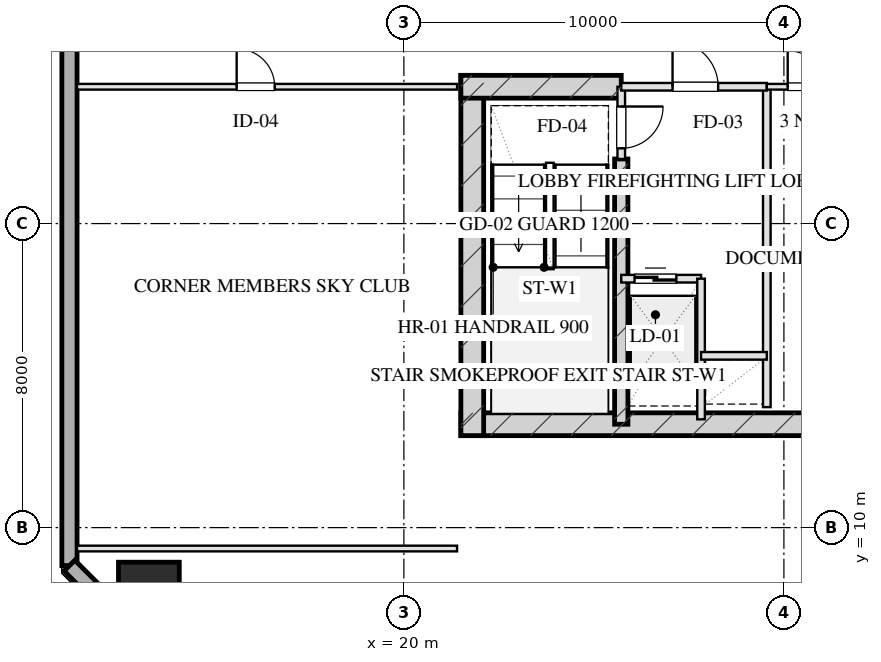
"""IFC4 building model, lengths in metres.
Left out: names, types, materials, properties, quantities, classifications, styles, units other than length and angle.
Written with IfcOpenShell. Run it as: python <this file> out.ifc"""

import sys

from ifc_helpers import new_model, si_unit, direction, frame, frame_2d, origin, origin_2d, place, context, subcontext, project, spatial, rectangle, hollow_rectangle, extrude, element, fill, save


model = new_model("IFC4")
c1 = context("Model", 3, precision=1e-05, world=origin(), true_north=direction((0.0, 1.0)))
c2 = subcontext(c1, "Body", "Model", "MODEL_VIEW")
j1 = project(units=[si_unit("LENGTHUNIT", "METRE"), si_unit("PLANEANGLEUNIT", "RADIAN")], contexts=[c1])
p1 = place(None, origin())
s1 = spatial("IfcSite", under=j1, at=p1, CompositionType="ELEMENT")
p2 = place(p1, origin())
s2 = spatial("IfcBuilding", under=s1, at=p2, CompositionType="ELEMENT")
p3 = place(p2, frame((0.0, 0.0, 152.95)))
s3 = spatial("IfcBuildingStorey", under=s2, at=p3, CompositionType="ELEMENT", Elevation=152.95)
p4 = place(p3, frame((21.5, 12.72, 0.0), z_axis=(0.0, 0.0, 1.0), x_axis=(1.0, 0.0, 0.0)))
e1 = element("IfcWall", 1, at=p4, inside=s3, PredefinedType="SHEAR", context=c2, shape_type="SweptSolid", body=[
    extrude(rectangle(XDim=17.0, YDim=0.6, at=frame_2d((8.5, 0.0))), origin(), (0.0, 0.0, 1.0), 3.45),
])
p5 = place(p3, frame((21.8, 21.9, 0.0), z_axis=(0.0, 0.0, 1.0), x_axis=(0.0, -1.0, 0.0)))
e2 = element("IfcWall", 2, at=p5, inside=s3, PredefinedType="SHEAR", context=c2, shape_type="SweptSolid", body=[
    extrude(rectangle(XDim=9.48, YDim=0.6, at=frame_2d((4.74, 0.0))), origin(), (0.0, 0.0, 1.0), 3.45),
])
p6 = place(p3, frame((25.72, 19.7, 0.0), z_axis=(0.0, 0.0, 1.0), x_axis=(0.0, -1.0, 0.0)))
e3 = element("IfcWall", 3, at=p6, inside=s3, PredefinedType="SHEAR", context=c2, shape_type="SweptSolid", body=[
    extrude(rectangle(XDim=6.98, YDim=0.35, at=frame_2d((3.49, 0.0))), origin(), (0.0, 0.0, 1.0), 3.45),
])
p7 = place(p3, frame((21.5, 21.6, 0.0), z_axis=(0.0, 0.0, 1.0), x_axis=(1.0, 0.0, 0.0)))
e4 = element("IfcWall", 4, at=p7, inside=s3, PredefinedType="SHEAR", context=c2, shape_type="SweptSolid", body=[
    extrude(rectangle(XDim=4.22, YDim=0.6, at=frame_2d((2.11, 0.0))), origin(), (0.0, 0.0, 1.0), 3.45),
])
p8 = place(p3, frame((13.29, 8.29, 0.0), z_axis=(0.0, 0.0, 1.0), x_axis=(1.0, 0.0, 0.0)))
e5 = element("IfcColumn", 5, at=p8, inside=s3, PredefinedType="COLUMN", context=c2, shape_type="SweptSolid", body=[
    extrude(hollow_rectangle(XDim=1.6, YDim=1.6, WallThickness=0.055, at=origin_2d()), origin(), (0.0, 0.0, 1.0), 3.451),
])
p9 = place(p3, frame((11.2, 9.0, 0.0), z_axis=(0.0, 0.0, 1.0), x_axis=(0.0, 1.0, 0.0)))
e6 = element("IfcWall", 6, at=p9, inside=s3, PredefinedType="SOLIDWALL", context=c2, shape_type="SweptSolid", body=[
    extrude(rectangle(XDim=50.0, YDim=0.4, at=frame_2d((25.0, 0.0))), origin(), (0.0, 0.0, 1.0), 2.61),
])
p10 = place(p9, frame((30.275, 0.0, 0.75)))
e7 = element("IfcOpeningElement", 7, at=p10, cuts=e6, PredefinedType="OPENING", context=c2, shape_type="SweptSolid", body=[
    extrude(rectangle(XDim=2.25, YDim=1.46, at=frame_2d((1.125, 0.73))), frame((0.0, 0.21, 0.0), z_axis=(0.0, -1.0, 0.0), x_axis=(1.0, 0.0, 0.0)), (0.0, 0.0, 1.0), 0.42),
])
p11 = place(p9, frame((18.65, 0.0, 0.0)))
e8 = element("IfcOpeningElement", 8, at=p11, cuts=e6, PredefinedType="OPENING", context=c2, shape_type="SweptSolid", body=[
    extrude(rectangle(XDim=1.1, YDim=2.15, at=frame_2d((0.55, 1.075))), frame((0.0, 0.21, 0.0), z_axis=(0.0, -1.0, 0.0), x_axis=(1.0, 0.0, 0.0)), (0.0, 0.0, 1.0), 0.42),
])
p12 = place(p3, frame((14.0, 6.2, 0.0), z_axis=(0.0, 0.0, 1.0), x_axis=(-0.707106781187, 0.707106781187, 0.0)))
e9 = element("IfcWall", 9, at=p12, inside=s3, PredefinedType="SOLIDWALL", context=c2, shape_type="SweptSolid", body=[
    extrude(rectangle(XDim=3.96, YDim=0.4, at=frame_2d((1.98, 0.0))), origin(), (0.0, 0.0, 1.0), 2.61),
])
p13 = place(p3, frame((25.72, 21.6, 0.0), z_axis=(0.0, 0.0, 1.0), x_axis=(0.0, -1.0, 0.0)))
e10 = element("IfcWall", 10, at=p13, inside=s3, PredefinedType="PARTITIONING", context=c2, shape_type="SweptSolid", body=[
    extrude(rectangle(XDim=1.9, YDim=0.2, at=frame_2d((0.95, 0.0))), origin(), (0.0, 0.0, 1.0), 3.175),
])
p14 = place(p13, frame((0.52, 0.0, 0.0)))
e11 = element("IfcOpeningElement", 11, at=p14, cuts=e10, PredefinedType="OPENING", context=c2, shape_type="SweptSolid", body=[
    extrude(rectangle(XDim=1.1, YDim=2.05, at=frame_2d((0.55, 1.025))), frame((0.0, 0.11, 0.0), z_axis=(0.0, -1.0, 0.0), x_axis=(1.0, 0.0, 0.0)), (0.0, 0.0, 1.0), 0.22),
])
p15 = place(p3, frame((29.55, 21.6, 0.0), z_axis=(0.0, 0.0, 1.0), x_axis=(0.0, -1.0, 0.0)))
e12 = element("IfcWall", 12, at=p15, inside=s3, PredefinedType="PARTITIONING", context=c2, shape_type="SweptSolid", body=[
    extrude(rectangle(XDim=8.43, YDim=0.2, at=frame_2d((4.215, 0.0))), origin(), (0.0, 0.0, 1.0), 3.175),
])
p16 = place(p3, frame((25.72, 21.6, 0.0), z_axis=(0.0, 0.0, 1.0), x_axis=(1.0, 0.0, 0.0)))
e13 = element("IfcWall", 13, at=p16, inside=s3, PredefinedType="PARTITIONING", context=c2, shape_type="SweptSolid", body=[
    extrude(rectangle(XDim=3.83, YDim=0.2, at=frame_2d((1.915, 0.0))), origin(), (0.0, 0.0, 1.0), 3.175),
])
p17 = place(p16, frame((1.35, 0.0, 0.0)))
e14 = element("IfcOpeningElement", 14, at=p17, cuts=e13, PredefinedType="OPENING", context=c2, shape_type="SweptSolid", body=[
    extrude(rectangle(XDim=1.2, YDim=2.05, at=frame_2d((0.6, 1.025))), frame((0.0, 0.11, 0.0), z_axis=(0.0, -1.0, 0.0), x_axis=(1.0, 0.0, 0.0)), (0.0, 0.0, 1.0), 0.22),
])
p18 = place(p3, frame((25.72, 16.55, 0.0), z_axis=(0.0, 0.0, 1.0), x_axis=(1.0, 0.0, 0.0)))
e15 = element("IfcWall", 15, at=p18, inside=s3, PredefinedType="PARTITIONING", context=c2, shape_type="SweptSolid", body=[
    extrude(rectangle(XDim=2.1, YDim=0.2, at=frame_2d((1.05, 0.0))), origin(), (0.0, 0.0, 1.0), 3.175),
])
p19 = place(p18, frame((0.35, 0.0, 0.0)))
e16 = element("IfcOpeningElement", 16, at=p19, cuts=e15, PredefinedType="OPENING", context=c2, shape_type="SweptSolid", body=[
    extrude(rectangle(XDim=1.1, YDim=2.05, at=frame_2d((0.55, 1.025))), frame((0.0, 0.11, 0.0), z_axis=(0.0, -1.0, 0.0), x_axis=(1.0, 0.0, 0.0)), (0.0, 0.0, 1.0), 0.22),
])
p20 = place(p3, frame((27.82, 16.55, 0.0), z_axis=(0.0, 0.0, 1.0), x_axis=(0.0, -1.0, 0.0)))
e17 = element("IfcWall", 17, at=p20, inside=s3, PredefinedType="PARTITIONING", context=c2, shape_type="SweptSolid", body=[
    extrude(rectangle(XDim=3.7, YDim=0.2, at=frame_2d((1.85, 0.0))), origin(), (0.0, 0.0, 1.0), 3.175),
])
p21 = place(p3, frame((27.82, 14.52, 0.0), z_axis=(0.0, 0.0, 1.0), x_axis=(1.0, 0.0, 0.0)))
e18 = element("IfcWall", 18, at=p21, inside=s3, PredefinedType="PARTITIONING", context=c2, shape_type="SweptSolid", body=[
    extrude(rectangle(XDim=1.73, YDim=0.2, at=frame_2d((0.865, 0.0))), origin(), (0.0, 0.0, 1.0), 3.175),
])
p22 = place(p3, frame((29.55, 21.6, 0.0), z_axis=(0.0, 0.0, 1.0), x_axis=(1.0, 0.0, 0.0)))
e19 = element("IfcWall", 19, at=p22, inside=s3, PredefinedType="PARTITIONING", context=c2, shape_type="SweptSolid", body=[
    extrude(rectangle(XDim=4.4, YDim=0.15, at=frame_2d((2.2, 0.0))), origin(), (0.0, 0.0, 1.0), 3.175),
])
p23 = place(p22, frame((0.55, 0.0, 0.0)))
e20 = element("IfcOpeningElement", 20, at=p23, cuts=e19, PredefinedType="OPENING", context=c2, shape_type="SweptSolid", body=[
    extrude(rectangle(XDim=0.95, YDim=2.05, at=frame_2d((0.475, 1.025))), frame((0.0, 0.085, 0.0), z_axis=(0.0, -1.0, 0.0), x_axis=(1.0, 0.0, 0.0)), (0.0, 0.0, 1.0), 0.17),
])
p24 = place(p22, frame((2.7, 0.0, 0.0)))
e21 = element("IfcOpeningElement", 21, at=p24, cuts=e19, PredefinedType="OPENING", context=c2, shape_type="SweptSolid", body=[
    extrude(rectangle(XDim=0.95, YDim=2.05, at=frame_2d((0.475, 1.025))), frame((0.0, 0.085, 0.0), z_axis=(0.0, -1.0, 0.0), x_axis=(1.0, 0.0, 0.0)), (0.0, 0.0, 1.0), 0.17),
])
p25 = place(p3, frame((11.4, 9.45, 0.0), z_axis=(0.0, 0.0, 1.0), x_axis=(1.0, 0.0, 0.0)))
e22 = element("IfcWall", 22, at=p25, inside=s3, PredefinedType="PARTITIONING", context=c2, shape_type="SweptSolid", body=[
    extrude(rectangle(XDim=10.0, YDim=0.15, at=frame_2d((5.0, 0.0))), origin(), (0.0, 0.0, 1.0), 3.175),
])
p26 = place(p3, frame((11.4, 21.6, 0.0), z_axis=(0.0, 0.0, 1.0), x_axis=(1.0, 0.0, 0.0)))
e23 = element("IfcWall", 23, at=p26, inside=s3, PredefinedType="PARTITIONING", context=c2, shape_type="SweptSolid", body=[
    extrude(rectangle(XDim=10.0, YDim=0.15, at=frame_2d((5.0, 0.0))), origin(), (0.0, 0.0, 1.0), 3.175),
])
p27 = place(p26, frame((4.2, 0.0, 0.0)))
e24 = element("IfcOpeningElement", 24, at=p27, cuts=e23, PredefinedType="OPENING", context=c2, shape_type="SweptSolid", body=[
    extrude(rectangle(XDim=1.0, YDim=2.05, at=frame_2d((0.5, 1.025))), frame((0.0, 0.085, 0.0), z_axis=(0.0, -1.0, 0.0), x_axis=(1.0, 0.0, 0.0)), (0.0, 0.0, 1.0), 0.17),
])
p28 = place(p14, origin())
e25 = element("IfcDoor", 25, at=p28, inside=s3, OperationType="SINGLE_SWING_LEFT", PredefinedType="DOOR", context=c2, shape_type="SweptSolid", body=[
    extrude(rectangle(XDim=1.1, YDim=2.05, at=frame_2d((0.55, 1.025))), frame((0.0, 0.025, 0.0), z_axis=(0.0, -1.0, 0.0), x_axis=(1.0, 0.0, 0.0)), (0.0, 0.0, 1.0), 0.05),
])
fill(e11, e25)
p29 = place(p17, origin())
e26 = element("IfcDoor", 26, at=p29, inside=s3, OperationType="SINGLE_SWING_LEFT", PredefinedType="DOOR", context=c2, shape_type="SweptSolid", body=[
    extrude(rectangle(XDim=1.2, YDim=2.05, at=frame_2d((0.6, 1.025))), frame((0.0, 0.025, 0.0), z_axis=(0.0, -1.0, 0.0), x_axis=(1.0, 0.0, 0.0)), (0.0, 0.0, 1.0), 0.05),
])
fill(e14, e26)
p30 = place(p19, origin())
e27 = element("IfcDoor", 27, at=p30, inside=s3, OperationType="DOUBLE_DOOR_SLIDING", PredefinedType="DOOR", context=c2, shape_type="SweptSolid", body=[
    extrude(rectangle(XDim=1.1, YDim=2.05, at=frame_2d((0.55, 1.025))), frame((0.0, 0.025, 0.0), z_axis=(0.0, -1.0, 0.0), x_axis=(1.0, 0.0, 0.0)), (0.0, 0.0, 1.0), 0.05),
])
fill(e16, e27)
p31 = place(p23, origin())
e28 = element("IfcDoor", 28, at=p31, inside=s3, OperationType="SINGLE_SWING_LEFT", PredefinedType="DOOR", context=c2, shape_type="SweptSolid", body=[
    extrude(rectangle(XDim=0.95, YDim=2.05, at=frame_2d((0.475, 1.025))), frame((0.0, 0.025, 0.0), z_axis=(0.0, -1.0, 0.0), x_axis=(1.0, 0.0, 0.0)), (0.0, 0.0, 1.0), 0.05),
])
fill(e20, e28)
p32 = place(p27, origin())
e29 = element("IfcDoor", 29, at=p32, inside=s3, OperationType="SINGLE_SWING_LEFT", PredefinedType="DOOR", context=c2, shape_type="SweptSolid", body=[
    extrude(rectangle(XDim=1.0, YDim=2.05, at=frame_2d((0.5, 1.025))), frame((0.0, 0.025, 0.0), z_axis=(0.0, -1.0, 0.0), x_axis=(1.0, 0.0, 0.0)), (0.0, 0.0, 1.0), 0.05),
])
fill(e24, e29)
save(model, sys.argv[1])
